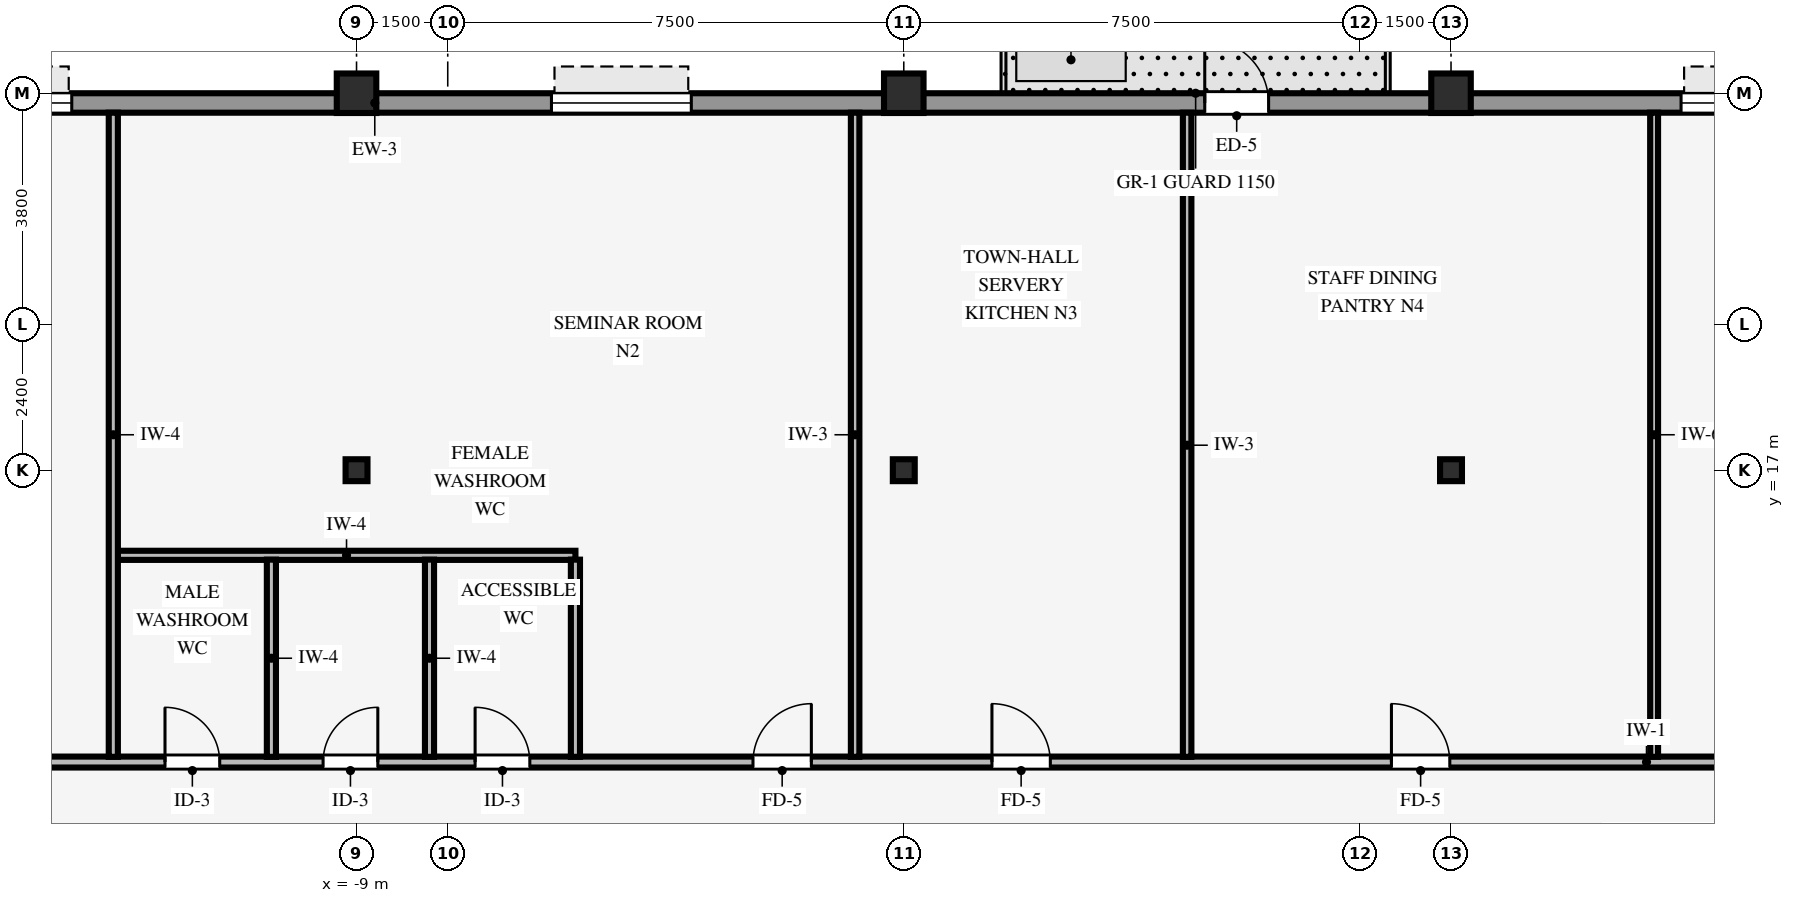
"""IFC4 building model, lengths in metres.
Left out: names, types, materials, properties, quantities, classifications, styles, units other than length and angle.
Written with IfcOpenShell. Run it as: python <this file> out.ifc"""

import sys

from ifc_helpers import new_model, si_unit, direction, frame, frame_2d, origin, origin_2d, place, context, subcontext, project, spatial, rectangle, hollow_rectangle, i_section, extrude, source, transform, mapped, element, fill, save


model = new_model("IFC4")
c1 = context("Model", 3, precision=1e-05, world=origin(), true_north=direction((0.0, 1.0)))
c2 = subcontext(c1, "Body", "Model", "MODEL_VIEW")
j1 = project(units=[si_unit("LENGTHUNIT", "METRE"), si_unit("PLANEANGLEUNIT", "RADIAN")], contexts=[c1])
p1 = place(None, origin())
s1 = spatial("IfcSite", under=j1, at=p1, CompositionType="ELEMENT")
p2 = place(p1, origin())
s2 = spatial("IfcBuilding", under=s1, at=p2, CompositionType="ELEMENT")
p3 = place(p2, frame((0.0, 0.0, 101.95)))
s3 = spatial("IfcBuildingStorey", under=s2, at=p3, CompositionType="ELEMENT", Elevation=101.95)
for number, where, z_axis, x_axis in (
    (1, (-9.0, 23.2, 0.0), (0.0, 0.0, 1.0), (1.0, 0.0, 0.0)),
    (2, (0.0, 23.2, 0.0), (0.0, 0.0, 1.0), (1.0, 0.0, 0.0)),
    (3, (9.0, 23.2, 0.0), (0.0, 0.0, 1.0), (1.0, 0.0, 0.0)),
):
    element("IfcColumn", number, at=place(p3, frame(where, z_axis=z_axis, x_axis=x_axis)), inside=s3, PredefinedType="COLUMN", context=c2, shape_type="SweptSolid", body=[
        extrude(hollow_rectangle(XDim=0.65, YDim=0.65, WallThickness=0.04, InnerFilletRadius=0.04, OuterFilletRadius=0.08, at=origin_2d()), origin(), (0.0, 0.0, 1.0), 3.37),
    ])
for number, where, z_axis, x_axis in (
    (4, (0.0, 17.0, 0.0), (0.0, 0.0, 1.0), (1.0, 0.0, 0.0)),
    (5, (-9.0, 17.0, 0.0), (0.0, 0.0, 1.0), (1.0, 0.0, 0.0)),
    (6, (9.0, 17.0, 0.0), (0.0, 0.0, 1.0), (1.0, 0.0, 0.0)),
):
    element("IfcColumn", number, at=place(p3, frame(where, z_axis=z_axis, x_axis=x_axis)), inside=s3, PredefinedType="COLUMN", context=c2, shape_type="SweptSolid", body=[
        extrude(i_section(OverallWidth=0.36, OverallDepth=0.36, WebThickness=0.021, FlangeThickness=0.021, FilletRadius=0.018, at=origin_2d()), origin(), (0.0, 0.0, 1.0), 3.37),
    ])
p4 = place(p3, frame((-21.9, 23.04, 0.0), z_axis=(0.0, 0.0, 1.0), x_axis=(1.0, 0.0, 0.0)))
e7 = element("IfcWall", 7, at=p4, inside=s3, PredefinedType="STANDARD", context=c2, shape_type="SweptSolid", body=[
    extrude(rectangle(XDim=43.8, YDim=0.32, at=frame_2d((21.9, 0.0))), origin(), (0.0, 0.0, 1.0), 2.705),
])
p5 = place(p4, frame((26.85, 0.0, 0.0)))
e8 = element("IfcOpeningElement", 8, at=p5, cuts=e7, PredefinedType="OPENING", context=c2, shape_type="SweptSolid", body=[
    extrude(rectangle(XDim=1.05, YDim=2.1, at=frame_2d((0.525, 1.05))), frame((0.0, 0.17, 0.0), z_axis=(0.0, -1.0, 0.0), x_axis=(1.0, 0.0, 0.0)), (0.0, 0.0, 1.0), 0.34),
])
p6 = place(p4, frame((2.172, 0.0, 0.8)))
e9 = element("IfcOpeningElement", 9, at=p6, cuts=e7, PredefinedType="OPENING", context=c2, shape_type="SweptSolid", body=[
    extrude(rectangle(XDim=2.3, YDim=1.62, at=frame_2d((1.15, 0.81))), frame((0.0, 0.17, 0.0), z_axis=(0.0, -1.0, 0.0), x_axis=(1.0, 0.0, 0.0)), (0.0, 0.0, 1.0), 0.34),
])
p7 = place(p4, frame((5.917, 0.0, 0.8)))
e10 = element("IfcOpeningElement", 10, at=p7, cuts=e7, PredefinedType="OPENING", context=c2, shape_type="SweptSolid", body=[
    extrude(rectangle(XDim=2.3, YDim=1.62, at=frame_2d((1.15, 0.81))), frame((0.0, 0.17, 0.0), z_axis=(0.0, -1.0, 0.0), x_axis=(1.0, 0.0, 0.0)), (0.0, 0.0, 1.0), 0.34),
])
p8 = place(p4, frame((16.106, 0.0, 0.8)))
e11 = element("IfcOpeningElement", 11, at=p8, cuts=e7, PredefinedType="OPENING", context=c2, shape_type="SweptSolid", body=[
    extrude(rectangle(XDim=2.3, YDim=1.62, at=frame_2d((1.15, 0.81))), frame((0.0, 0.17, 0.0), z_axis=(0.0, -1.0, 0.0), x_axis=(1.0, 0.0, 0.0)), (0.0, 0.0, 1.0), 0.34),
])
p9 = place(p4, frame((34.683, 0.0, 0.8)))
e12 = element("IfcOpeningElement", 12, at=p9, cuts=e7, PredefinedType="OPENING", context=c2, shape_type="SweptSolid", body=[
    extrude(rectangle(XDim=2.3, YDim=1.62, at=frame_2d((1.15, 0.81))), frame((0.0, 0.17, 0.0), z_axis=(0.0, -1.0, 0.0), x_axis=(1.0, 0.0, 0.0)), (0.0, 0.0, 1.0), 0.34),
])
p10 = place(p4, frame((39.328, 0.0, 0.8)))
e13 = element("IfcOpeningElement", 13, at=p10, cuts=e7, PredefinedType="OPENING", context=c2, shape_type="SweptSolid", body=[
    extrude(rectangle(XDim=2.3, YDim=1.62, at=frame_2d((1.15, 0.81))), frame((0.0, 0.17, 0.0), z_axis=(0.0, -1.0, 0.0), x_axis=(1.0, 0.0, 0.0)), (0.0, 0.0, 1.0), 0.34),
])
p11 = place(p3, frame((-15.0, 12.2, 0.0), z_axis=(0.0, 0.0, 1.0), x_axis=(1.0, 0.0, 0.0)))
e14 = element("IfcWall", 14, at=p11, inside=s3, PredefinedType="PARTITIONING", context=c2, shape_type="SweptSolid", body=[
    extrude(rectangle(XDim=30.0, YDim=0.18, at=frame_2d((15.0, 0.0))), origin(), (0.0, 0.0, 1.0), 3.36),
])
p12 = place(p11, frame((23.02, 0.0, 0.0)))
e15 = element("IfcOpeningElement", 15, at=p12, cuts=e14, PredefinedType="OPENING", context=c2, shape_type="SweptSolid", body=[
    extrude(rectangle(XDim=0.96, YDim=2.1, at=frame_2d((0.48, 1.05))), frame((0.0, 0.1, 0.0), z_axis=(0.0, -1.0, 0.0), x_axis=(1.0, 0.0, 0.0)), (0.0, 0.0, 1.0), 0.2),
])
p13 = place(p11, frame((16.45, 0.0, 0.0)))
e16 = element("IfcOpeningElement", 16, at=p13, cuts=e14, PredefinedType="OPENING", context=c2, shape_type="SweptSolid", body=[
    extrude(rectangle(XDim=0.96, YDim=2.1, at=frame_2d((0.48, 1.05))), frame((0.0, 0.1, 0.0), z_axis=(0.0, -1.0, 0.0), x_axis=(1.0, 0.0, 0.0)), (0.0, 0.0, 1.0), 0.2),
])
p14 = place(p11, frame((5.45, 0.0, 0.0)))
e17 = element("IfcOpeningElement", 17, at=p14, cuts=e14, PredefinedType="OPENING", context=c2, shape_type="SweptSolid", body=[
    extrude(rectangle(XDim=0.9, YDim=2.1, at=frame_2d((0.45, 1.05))), frame((0.0, 0.1, 0.0), z_axis=(0.0, -1.0, 0.0), x_axis=(1.0, 0.0, 0.0)), (0.0, 0.0, 1.0), 0.2),
])
p15 = place(p11, frame((2.85, 0.0, 0.0)))
e18 = element("IfcOpeningElement", 18, at=p15, cuts=e14, PredefinedType="OPENING", context=c2, shape_type="SweptSolid", body=[
    extrude(rectangle(XDim=0.9, YDim=2.1, at=frame_2d((0.45, 1.05))), frame((0.0, 0.1, 0.0), z_axis=(0.0, -1.0, 0.0), x_axis=(1.0, 0.0, 0.0)), (0.0, 0.0, 1.0), 0.2),
])
p16 = place(p11, frame((12.52, 0.0, 0.0)))
e19 = element("IfcOpeningElement", 19, at=p16, cuts=e14, PredefinedType="OPENING", context=c2, shape_type="SweptSolid", body=[
    extrude(rectangle(XDim=0.96, YDim=2.1, at=frame_2d((0.48, 1.05))), frame((0.0, 0.1, 0.0), z_axis=(0.0, -1.0, 0.0), x_axis=(1.0, 0.0, 0.0)), (0.0, 0.0, 1.0), 0.2),
])
p17 = place(p11, frame((7.95, 0.0, 0.0)))
e20 = element("IfcOpeningElement", 20, at=p17, cuts=e14, PredefinedType="OPENING", context=c2, shape_type="SweptSolid", body=[
    extrude(rectangle(XDim=0.9, YDim=2.1, at=frame_2d((0.45, 1.05))), frame((0.0, 0.1, 0.0), z_axis=(0.0, -1.0, 0.0), x_axis=(1.0, 0.0, 0.0)), (0.0, 0.0, 1.0), 0.2),
])
p18 = place(p3, frame((-12.929, 15.6, 0.0), z_axis=(0.0, 0.0, 1.0), x_axis=(1.0, 0.0, 0.0)))
e21 = element("IfcWall", 21, at=p18, inside=s3, PredefinedType="PARTITIONING", context=c2, shape_type="SweptSolid", body=[
    extrude(rectangle(XDim=7.529, YDim=0.15, at=frame_2d((3.765, 0.0))), origin(), (0.0, 0.0, 1.0), 3.36),
])
p19 = place(p3, frame((-13.0, 12.286, 0.0), z_axis=(0.0, 0.0, 1.0), x_axis=(0.0, 1.0, 0.0)))
e22 = element("IfcWall", 22, at=p19, inside=s3, PredefinedType="PARTITIONING", context=c2, shape_type="SweptSolid", body=[
    extrude(rectangle(XDim=10.594, YDim=0.15, at=frame_2d((5.297, 0.0))), origin(), (0.0, 0.0, 1.0), 3.36),
])
for number, where, z_axis, x_axis in (
    (23, (-10.4, 12.286, 0.0), (0.0, 0.0, 1.0), (0.0, 1.0, 0.0)),
    (24, (-7.8, 12.286, 0.0), (0.0, 0.0, 1.0), (0.0, 1.0, 0.0)),
    (25, (-5.4, 12.286, 0.0), (0.0, 0.0, 1.0), (0.0, 1.0, 0.0)),
):
    element("IfcWall", number, at=place(p3, frame(where, z_axis=z_axis, x_axis=x_axis)), inside=s3, PredefinedType="PARTITIONING", context=c2, shape_type="SweptSolid", body=[
        extrude(rectangle(XDim=3.243, YDim=0.15, at=frame_2d((1.622, 0.0))), origin(), (0.0, 0.0, 1.0), 3.36),
    ])
for number, where, z_axis, x_axis in (
    (26, (-0.8, 12.286, 0.0), (0.0, 0.0, 1.0), (0.0, 1.0, 0.0)),
    (27, (4.66, 12.286, 0.0), (0.0, 0.0, 1.0), (0.0, 1.0, 0.0)),
):
    element("IfcWall", number, at=place(p3, frame(where, z_axis=z_axis, x_axis=x_axis)), inside=s3, PredefinedType="PARTITIONING", context=c2, shape_type="SweptSolid", body=[
        extrude(rectangle(XDim=10.594, YDim=0.14, at=frame_2d((5.297, 0.0))), origin(), (0.0, 0.0, 1.0), 3.36),
    ])
p20 = place(p3, frame((12.34, 12.286, 0.0), z_axis=(0.0, 0.0, 1.0), x_axis=(0.0, 1.0, 0.0)))
e28 = element("IfcWall", 28, at=p20, inside=s3, PredefinedType="PARTITIONING", context=c2, shape_type="SweptSolid", body=[
    extrude(rectangle(XDim=10.594, YDim=0.13, at=frame_2d((5.297, 0.0))), origin(), (0.0, 0.0, 1.0), 3.36),
])
m1 = source(origin(), c2, "Body", "SweptSolid", [
    extrude(rectangle(XDim=1.05, YDim=2.1, at=frame_2d((0.525, 1.05))), frame((0.0, 0.025, 0.0), z_axis=(0.0, -1.0, 0.0), x_axis=(1.0, 0.0, 0.0)), (0.0, 0.0, 1.0), 0.05),
])
p21 = place(p5, origin())
e29 = element("IfcDoor", 29, at=p21, inside=s3, OperationType="SINGLE_SWING_LEFT", PredefinedType="DOOR", context=c2, shape_type="MappedRepresentation", body=[
    mapped(m1, transform((0.0, 0.0, 0.0), scale=1.0)),
])
fill(e8, e29)
m2 = source(origin(), c2, "Body", "SweptSolid", [
    extrude(rectangle(XDim=2.3, YDim=1.62, at=frame_2d((1.15, 0.81))), frame((0.0, 0.03, 0.0), z_axis=(0.0, -1.0, 0.0), x_axis=(1.0, 0.0, 0.0)), (0.0, 0.0, 1.0), 0.06),
])
p22 = place(p7, origin())
e30 = element("IfcWindow", 30, at=p22, inside=s3, PartitioningType="SINGLE_PANEL", PredefinedType="WINDOW", context=c2, shape_type="MappedRepresentation", body=[
    mapped(m2, transform((0.0, 0.0, 0.0), scale=1.0)),
])
fill(e10, e30)
p23 = place(p8, origin())
e31 = element("IfcWindow", 31, at=p23, inside=s3, PartitioningType="SINGLE_PANEL", PredefinedType="WINDOW", context=c2, shape_type="MappedRepresentation", body=[
    mapped(m2, transform((0.0, 0.0, 0.0), scale=1.0)),
])
fill(e11, e31)
p24 = place(p9, origin())
e32 = element("IfcWindow", 32, at=p24, inside=s3, PartitioningType="SINGLE_PANEL", PredefinedType="WINDOW", context=c2, shape_type="MappedRepresentation", body=[
    mapped(m2, transform((0.0, 0.0, 0.0), scale=1.0)),
])
fill(e12, e32)
m3 = source(origin(), c2, "Body", "SweptSolid", [
    extrude(rectangle(XDim=0.96, YDim=2.1, at=frame_2d((0.48, 1.05))), frame((0.0, 0.025, 0.0), z_axis=(0.0, -1.0, 0.0), x_axis=(1.0, 0.0, 0.0)), (0.0, 0.0, 1.0), 0.05),
])
p25 = place(p12, origin())
e33 = element("IfcDoor", 33, at=p25, inside=s3, OperationType="SINGLE_SWING_LEFT", PredefinedType="DOOR", context=c2, shape_type="MappedRepresentation", body=[
    mapped(m3, transform((0.0, 0.0, 0.0), scale=1.0)),
])
fill(e15, e33)
p26 = place(p13, origin())
e34 = element("IfcDoor", 34, at=p26, inside=s3, OperationType="SINGLE_SWING_LEFT", PredefinedType="DOOR", context=c2, shape_type="MappedRepresentation", body=[
    mapped(m3, transform((0.0, 0.0, 0.0), scale=1.0)),
])
fill(e16, e34)
m4 = source(origin(), c2, "Body", "SweptSolid", [
    extrude(rectangle(XDim=0.9, YDim=2.1, at=frame_2d((0.45, 1.05))), frame((0.0, 0.025, 0.0), z_axis=(0.0, -1.0, 0.0), x_axis=(1.0, 0.0, 0.0)), (0.0, 0.0, 1.0), 0.05),
])
p27 = place(p14, origin())
e35 = element("IfcDoor", 35, at=p27, inside=s3, OperationType="SINGLE_SWING_RIGHT", PredefinedType="DOOR", context=c2, shape_type="MappedRepresentation", body=[
    mapped(m4, transform((0.0, 0.0, 0.0), scale=1.0)),
])
fill(e17, e35)
p28 = place(p15, origin())
e36 = element("IfcDoor", 36, at=p28, inside=s3, OperationType="SINGLE_SWING_LEFT", PredefinedType="DOOR", context=c2, shape_type="MappedRepresentation", body=[
    mapped(m4, transform((0.0, 0.0, 0.0), scale=1.0)),
])
fill(e18, e36)
p29 = place(p16, origin())
e37 = element("IfcDoor", 37, at=p29, inside=s3, OperationType="SINGLE_SWING_RIGHT", PredefinedType="DOOR", context=c2, shape_type="MappedRepresentation", body=[
    mapped(m3, transform((0.0, 0.0, 0.0), scale=1.0)),
])
fill(e19, e37)
p30 = place(p17, origin())
e38 = element("IfcDoor", 38, at=p30, inside=s3, OperationType="SINGLE_SWING_LEFT", PredefinedType="DOOR", context=c2, shape_type="MappedRepresentation", body=[
    mapped(m4, transform((0.0, 0.0, 0.0), scale=1.0)),
])
fill(e20, e38)
save(model, sys.argv[1])
